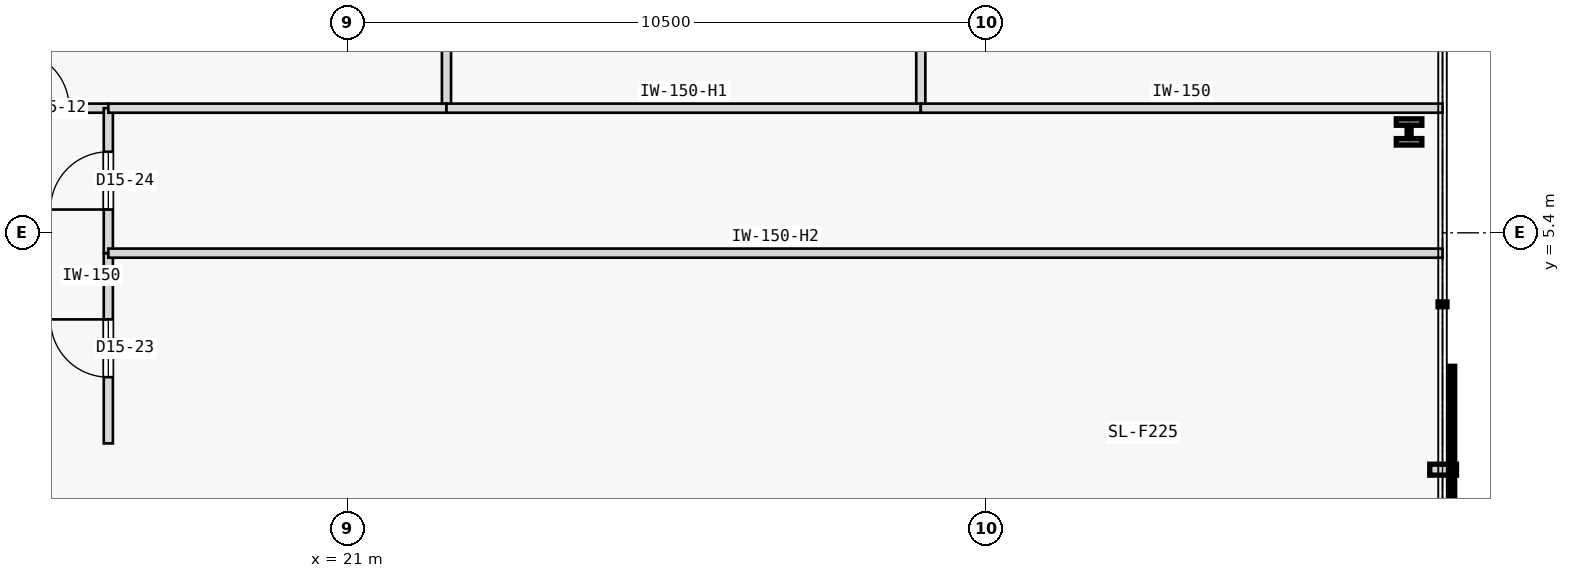
"""IFC4 building model, lengths in metres.
Left out: names, types, materials, properties, quantities, classifications, styles, units other than length and angle.
Written with IfcOpenShell. Run it as: python <this file> out.ifc"""

import sys

from ifc_helpers import new_model, si_unit, direction, frame, frame_2d, origin, origin_2d, place, context, subcontext, project, spatial, rectangle, i_section, extrude, element, fill, save


model = new_model("IFC4")
c1 = context("Model", 3, precision=1e-05, world=origin(), true_north=direction((0.0, 1.0)))
c2 = subcontext(c1, "Body", "Model", "MODEL_VIEW")
j1 = project(units=[si_unit("LENGTHUNIT", "METRE"), si_unit("PLANEANGLEUNIT", "RADIAN")], contexts=[c1])
p1 = place(None, origin())
s1 = spatial("IfcSite", under=j1, at=p1, CompositionType="ELEMENT")
p2 = place(p1, origin())
s2 = spatial("IfcBuilding", under=s1, at=p2, CompositionType="ELEMENT")
p3 = place(p2, frame((0.0, 0.0, 63.6)))
s3 = spatial("IfcBuildingStorey", under=s2, at=p3, CompositionType="ELEMENT", Elevation=63.6)
p4 = place(p3, frame((38.45, 7.059, 0.0), z_axis=(0.0, 0.0, 1.0), x_axis=(1.0, 0.0, 0.0)))
e1 = element("IfcColumn", 1, at=p4, inside=s3, PredefinedType="COLUMN", context=c2, shape_type="SweptSolid", body=[
    extrude(i_section(OverallWidth=0.42, OverallDepth=0.431, WebThickness=0.065, FlangeThickness=0.106, FilletRadius=0.015, at=origin_2d()), origin(), (0.0, 0.0, 1.0), 3.8),
])
p5 = place(p3, frame((14.82, 7.45, 0.0), z_axis=(0.0, 0.0, 1.0), x_axis=(1.0, 0.0, 0.0)))
e2 = element("IfcWall", 2, at=p5, inside=s3, PredefinedType="PARTITIONING", context=c2, shape_type="SweptSolid", body=[
    extrude(rectangle(XDim=2.239, YDim=0.15, at=frame_2d((1.12, 0.0))), origin(), (0.0, 0.0, 1.0), 3.575),
])
p6 = place(p5, frame((0.645, 0.0, 0.0)))
e3 = element("IfcOpeningElement", 3, at=p6, cuts=e2, PredefinedType="OPENING", context=c2, shape_type="SweptSolid", body=[
    extrude(rectangle(XDim=0.95, YDim=2.15, at=frame_2d((0.475, 1.075))), frame((0.0, 0.085, 0.0), z_axis=(0.0, -1.0, 0.0), x_axis=(1.0, 0.0, 0.0)), (0.0, 0.0, 1.0), 0.17),
])
p7 = place(p3, frame((17.059, 1.937, 0.0), z_axis=(0.0, 0.0, 1.0), x_axis=(0.0, 1.0, 0.0)))
e4 = element("IfcWall", 4, at=p7, inside=s3, PredefinedType="PARTITIONING", context=c2, shape_type="SweptSolid", body=[
    extrude(rectangle(XDim=3.129, YDim=0.15, at=frame_2d((1.564, 0.0))), origin(), (0.0, 0.0, 1.0), 3.575),
])
p8 = place(p7, frame((1.09, 0.0, 0.0)))
e5 = element("IfcOpeningElement", 5, at=p8, cuts=e4, PredefinedType="OPENING", context=c2, shape_type="SweptSolid", body=[
    extrude(rectangle(XDim=0.95, YDim=2.15, at=frame_2d((0.475, 1.075))), frame((0.0, 0.085, 0.0), z_axis=(0.0, -1.0, 0.0), x_axis=(1.0, 0.0, 0.0)), (0.0, 0.0, 1.0), 0.17),
])
p9 = place(p3, frame((17.059, 5.066, 0.0), z_axis=(0.0, 0.0, 1.0), x_axis=(0.0, 1.0, 0.0)))
e6 = element("IfcWall", 6, at=p9, inside=s3, PredefinedType="PARTITIONING", context=c2, shape_type="SweptSolid", body=[
    extrude(rectangle(XDim=2.384, YDim=0.15, at=frame_2d((1.192, 0.0))), origin(), (0.0, 0.0, 1.0), 3.575),
])
p10 = place(p9, frame((0.717, 0.0, 0.0)))
e7 = element("IfcOpeningElement", 7, at=p10, cuts=e6, PredefinedType="OPENING", context=c2, shape_type="SweptSolid", body=[
    extrude(rectangle(XDim=0.95, YDim=2.15, at=frame_2d((0.475, 1.075))), frame((0.0, 0.085, 0.0), z_axis=(0.0, -1.0, 0.0), x_axis=(1.0, 0.0, 0.0)), (0.0, 0.0, 1.0), 0.17),
])
p11 = place(p3, frame((22.62, 7.45, 0.0), z_axis=(0.0, 0.0, 1.0), x_axis=(0.0, 1.0, 0.0)))
e8 = element("IfcWall", 8, at=p11, inside=s3, PredefinedType="PARTITIONING", context=c2, shape_type="SweptSolid", body=[
    extrude(rectangle(XDim=17.55, YDim=0.15, at=frame_2d((8.775, 0.0))), origin(), (0.0, 0.0, 1.0), 3.575),
])
p12 = place(p11, frame((8.3, 0.0, 0.0)))
e9 = element("IfcOpeningElement", 9, at=p12, cuts=e8, PredefinedType="OPENING", context=c2, shape_type="SweptSolid", body=[
    extrude(rectangle(XDim=0.95, YDim=2.15, at=frame_2d((0.475, 1.075))), frame((0.0, 0.085, 0.0), z_axis=(0.0, -1.0, 0.0), x_axis=(1.0, 0.0, 0.0)), (0.0, 0.0, 1.0), 0.17),
])
p13 = place(p3, frame((17.059, 7.45, 0.0), z_axis=(0.0, 0.0, 1.0), x_axis=(1.0, 0.0, 0.0)))
e10 = element("IfcWall", 10, at=p13, inside=s3, PredefinedType="PARTITIONING", context=c2, shape_type="SweptSolid", body=[
    extrude(rectangle(XDim=5.561, YDim=0.15, at=frame_2d((2.781, 0.0))), origin(), (0.0, 0.0, 1.0), 3.575),
])
p14 = place(p3, frame((30.42, 7.45, 0.0), z_axis=(0.0, 0.0, 1.0), x_axis=(0.0, 1.0, 0.0)))
e11 = element("IfcWall", 11, at=p14, inside=s3, PredefinedType="PARTITIONING", context=c2, shape_type="SweptSolid", body=[
    extrude(rectangle(XDim=17.55, YDim=0.15, at=frame_2d((8.775, 0.0))), origin(), (0.0, 0.0, 1.0), 3.575),
])
p15 = place(p14, frame((8.3, 0.0, 0.0)))
e12 = element("IfcOpeningElement", 12, at=p15, cuts=e11, PredefinedType="OPENING", context=c2, shape_type="SweptSolid", body=[
    extrude(rectangle(XDim=0.95, YDim=2.15, at=frame_2d((0.475, 1.075))), frame((0.0, 0.085, 0.0), z_axis=(0.0, -1.0, 0.0), x_axis=(1.0, 0.0, 0.0)), (0.0, 0.0, 1.0), 0.17),
])
p16 = place(p3, frame((22.62, 7.45, 0.0), z_axis=(0.0, 0.0, 1.0), x_axis=(1.0, 0.0, 0.0)))
e13 = element("IfcWall", 13, at=p16, inside=s3, PredefinedType="PARTITIONING", context=c2, shape_type="SweptSolid", body=[
    extrude(rectangle(XDim=7.8, YDim=0.15, at=frame_2d((3.9, 0.0))), origin(), (0.0, 0.0, 1.0), 3.125),
])
p17 = place(p3, frame((30.42, 7.45, 0.0), z_axis=(0.0, 0.0, 1.0), x_axis=(1.0, 0.0, 0.0)))
e14 = element("IfcWall", 14, at=p17, inside=s3, PredefinedType="PARTITIONING", context=c2, shape_type="SweptSolid", body=[
    extrude(rectangle(XDim=8.58, YDim=0.15, at=frame_2d((4.29, 0.0))), origin(), (0.0, 0.0, 1.0), 3.575),
])
p18 = place(p3, frame((17.059, 5.066, 0.0), z_axis=(0.0, 0.0, 1.0), x_axis=(1.0, 0.0, 0.0)))
e15 = element("IfcWall", 15, at=p18, inside=s3, PredefinedType="PARTITIONING", context=c2, shape_type="SweptSolid", body=[
    extrude(rectangle(XDim=21.941, YDim=0.15, at=frame_2d((10.97, 0.0))), origin(), (0.0, 0.0, 1.0), 2.975),
])
p19 = place(p6, origin())
e16 = element("IfcDoor", 16, at=p19, inside=s3, OperationType="SINGLE_SWING_LEFT", PredefinedType="DOOR", context=c2, shape_type="SweptSolid", body=[
    extrude(rectangle(XDim=0.95, YDim=2.15, at=frame_2d((0.475, 1.075))), frame((0.0, 0.025, 0.0), z_axis=(0.0, -1.0, 0.0), x_axis=(1.0, 0.0, 0.0)), (0.0, 0.0, 1.0), 0.05),
])
fill(e3, e16)
p20 = place(p8, origin())
e17 = element("IfcDoor", 17, at=p20, inside=s3, OperationType="SINGLE_SWING_RIGHT", PredefinedType="DOOR", context=c2, shape_type="SweptSolid", body=[
    extrude(rectangle(XDim=0.95, YDim=2.15, at=frame_2d((0.475, 1.075))), frame((0.0, 0.025, 0.0), z_axis=(0.0, -1.0, 0.0), x_axis=(1.0, 0.0, 0.0)), (0.0, 0.0, 1.0), 0.05),
])
fill(e5, e17)
p21 = place(p10, origin())
e18 = element("IfcDoor", 18, at=p21, inside=s3, OperationType="SINGLE_SWING_LEFT", PredefinedType="DOOR", context=c2, shape_type="SweptSolid", body=[
    extrude(rectangle(XDim=0.95, YDim=2.15, at=frame_2d((0.475, 1.075))), frame((0.0, 0.025, 0.0), z_axis=(0.0, -1.0, 0.0), x_axis=(1.0, 0.0, 0.0)), (0.0, 0.0, 1.0), 0.05),
])
fill(e7, e18)
save(model, sys.argv[1])
